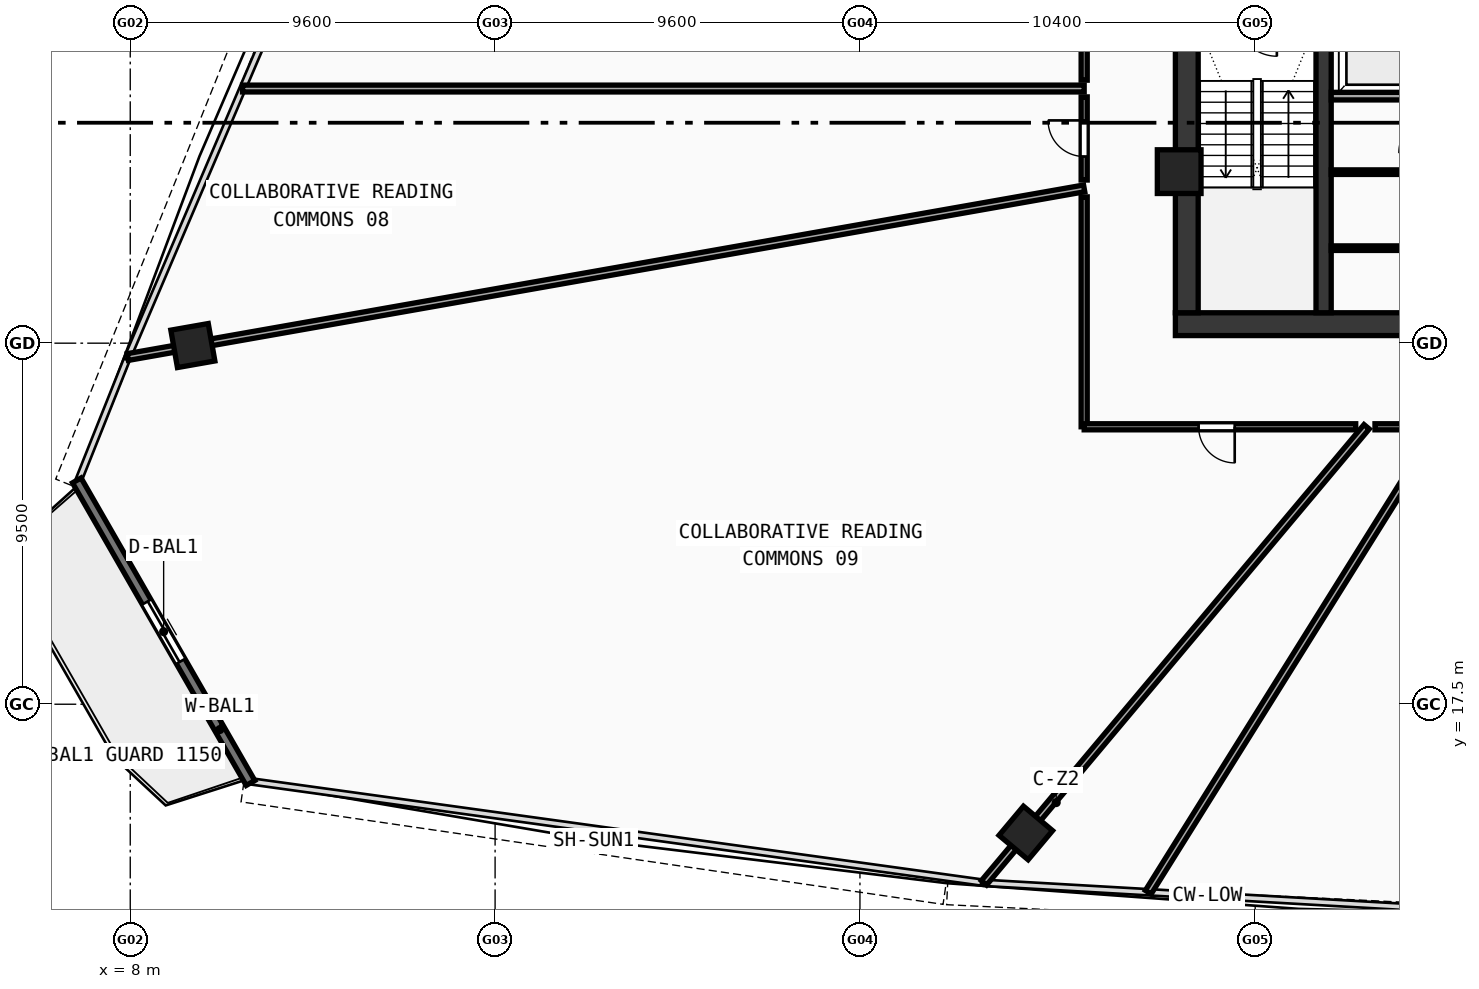
"""IFC4 building model, lengths in metres.
Left out: names, types, materials, properties, quantities, classifications, styles, units other than length and angle.
Written with IfcOpenShell. Run it as: python <this file> out.ifc"""

import sys

from ifc_helpers import new_model, si_unit, direction, frame, frame_2d, origin, origin_with_axes, origin_2d, place, context, subcontext, project, spatial, rectangle, hollow_rectangle, extrude, source, transform, mapped, element, fill, save


model = new_model("IFC4")
c1 = context("Model", 3, precision=1e-05, world=origin(), true_north=direction((0.0, 1.0)))
c2 = subcontext(c1, "Body", "Model", "MODEL_VIEW")
j1 = project(units=[si_unit("LENGTHUNIT", "METRE"), si_unit("PLANEANGLEUNIT", "RADIAN")], contexts=[c1])
p1 = place(None, origin())
s1 = spatial("IfcSite", under=j1, at=p1, CompositionType="ELEMENT")
p2 = place(p1, origin())
s2 = spatial("IfcBuilding", under=s1, at=p2, CompositionType="ELEMENT")
p3 = place(p2, frame((0.0, 0.0, 103.98)))
s3 = spatial("IfcBuildingStorey", under=s2, at=p3, CompositionType="ELEMENT", Elevation=103.98)
p4 = place(p3, frame((35.5, 27.5, 0.0), z_axis=(0.0, 0.0, 1.0), x_axis=(1.0, 0.0, 0.0)))
e1 = element("IfcWall", 1, at=p4, inside=s3, PredefinedType="SHEAR", context=c2, shape_type="SweptSolid", body=[
    extrude(rectangle(XDim=25.0, YDim=0.6, at=frame_2d((12.5, 0.0))), origin(), (0.0, 0.0, 1.0), 3.54),
])
p5 = place(p3, frame((35.8, 27.8, 0.0), z_axis=(0.0, 0.0, 1.0), x_axis=(0.0, 1.0, 0.0)))
e2 = element("IfcWall", 2, at=p5, inside=s3, PredefinedType="SHEAR", context=c2, shape_type="SweptSolid", body=[
    extrude(rectangle(XDim=12.1, YDim=0.6, at=frame_2d((6.05, 0.0))), origin(), (0.0, 0.0, 1.0), 3.54),
])
p6 = place(p3, frame((39.4, 27.8, 0.0), z_axis=(0.0, 0.0, 1.0), x_axis=(0.0, 1.0, 0.0)))
e3 = element("IfcWall", 3, at=p6, inside=s3, PredefinedType="SHEAR", context=c2, shape_type="SweptSolid", body=[
    extrude(rectangle(XDim=12.1, YDim=0.4, at=frame_2d((6.05, 0.0))), origin(), (0.0, 0.0, 1.0), 3.54),
])
p7 = place(p6, frame((9.95, 0.0, 0.0)))
e4 = element("IfcOpeningElement", 4, at=p7, cuts=e3, PredefinedType="OPENING", context=c2, shape_type="SweptSolid", body=[
    extrude(rectangle(XDim=1.1, YDim=2.1, at=frame_2d((0.55, 1.05))), frame((0.0, 0.21, 0.0), z_axis=(0.0, -1.0, 0.0), x_axis=(1.0, 0.0, 0.0)), (0.0, 0.0, 1.0), 0.42),
])
m1 = source(origin(), c2, "Body", "SweptSolid", [
    extrude(hollow_rectangle(XDim=1.15, YDim=1.15, WallThickness=0.048, at=origin_2d()), origin(), (0.0, 0.0, 1.0), 3.8),
])
p8 = place(p3, frame((35.6, 31.513, -0.26), z_axis=(0.0, 0.0, 1.0), x_axis=(1.0, 0.0, 0.0)))
e5 = element("IfcColumn", 5, at=p8, inside=s3, PredefinedType="COLUMN", context=c2, shape_type="MappedRepresentation", body=[
    mapped(m1, transform((0.0, 0.0, 0.0), scale=1.0)),
])
m2 = source(origin(), c2, "Body", "SweptSolid", [
    extrude(hollow_rectangle(XDim=1.0, YDim=1.0, WallThickness=0.042, at=origin_2d()), origin(), (0.0, 0.0, 1.0), 3.8),
])
for number, where, z_axis, x_axis in (
    (6, (31.564, 14.112, -0.26), (0.0, 0.0, 1.0), (0.766, -0.643, 0.0)),
    (7, (9.647, 26.938, -0.26), (0.0, 0.0, 1.0), (0.174, -0.985, 0.0)),
):
    element("IfcColumn", number, at=place(p3, frame(where, z_axis=z_axis, x_axis=x_axis)), inside=s3, PredefinedType="COLUMN", context=c2, shape_type="MappedRepresentation", body=[
        mapped(m2, transform((0.0, 0.0, 0.0), scale=1.0)),
    ])
p9 = place(p3, frame((6.593, 23.39, 0.0), z_axis=(0.0, 0.0, 1.0), x_axis=(0.497913445573, -0.867226729707, 0.0)))
e8 = element("IfcWall", 8, at=p9, inside=s3, PredefinedType="STANDARD", context=c2, shape_type="SweptSolid", body=[
    extrude(rectangle(XDim=9.181, YDim=0.26, at=frame_2d((4.59, 0.0))), origin(), (0.0, 0.0, 1.0), 3.54),
])
p10 = place(p9, frame((3.69, 0.0, 0.0)))
e9 = element("IfcOpeningElement", 9, at=p10, cuts=e8, PredefinedType="OPENING", context=c2, shape_type="SweptSolid", body=[
    extrude(rectangle(XDim=1.8, YDim=2.15, at=frame_2d((0.9, 1.075))), frame((0.0, 0.14, 0.0), z_axis=(0.0, -1.0, 0.0), x_axis=(1.0, 0.0, 0.0)), (0.0, 0.0, 1.0), 0.28),
])
p11 = place(p3, frame((39.6, 33.5, 0.0), z_axis=(0.0, 0.0, 1.0), x_axis=(1.0, 0.0, 0.0)))
e10 = element("IfcWall", 10, at=p11, inside=s3, PredefinedType="SOLIDWALL", context=c2, shape_type="SweptSolid", body=[
    extrude(rectangle(XDim=2.72, YDim=0.2, at=frame_2d((1.36, 0.0))), origin(), (0.0, 0.0, 1.0), 3.54),
])
for number, where, z_axis, x_axis in (
    (11, (39.6, 29.5, 0.0), (0.0, 0.0, 1.0), (1.0, 0.0, 0.0)),
    (12, (39.6, 31.5, 0.0), (0.0, 0.0, 1.0), (1.0, 0.0, 0.0)),
):
    element("IfcWall", number, at=place(p3, frame(where, z_axis=z_axis, x_axis=x_axis)), inside=s3, PredefinedType="PARTITIONING", context=c2, shape_type="SweptSolid", body=[
        extrude(rectangle(XDim=2.72, YDim=0.12, at=frame_2d((1.36, 0.0))), origin(), (0.0, 0.0, 1.0), 3.54),
    ])
p12 = place(p3, frame((33.1, 33.7, 0.0), z_axis=(0.0, 0.0, 1.0), x_axis=(-1.0, 0.0, 0.0)))
e13 = element("IfcWall", 13, at=p12, inside=s3, PredefinedType="PARTITIONING", context=c2, shape_type="SweptSolid", body=[
    extrude(rectangle(XDim=22.145, YDim=0.18, at=frame_2d((11.073, 0.0))), origin(), (0.0, 0.0, 1.0), 2.84),
])
p13 = place(p3, frame((33.1, 31.073, 0.0), z_axis=(0.0, 0.0, 1.0), x_axis=(-0.984807595402, -0.173649071515, 0.0)))
e14 = element("IfcWall", 14, at=p13, inside=s3, PredefinedType="PARTITIONING", context=c2, shape_type="SweptSolid", body=[
    extrude(rectangle(XDim=25.553, YDim=0.18, at=frame_2d((12.776, 0.0))), origin(), (0.0, 0.0, 1.0), 2.84),
])
p14 = place(p3, frame((40.532, 24.8, 0.0), z_axis=(0.0, 0.0, 1.0), x_axis=(-0.642779306778, -0.76605141001, 0.0)))
e15 = element("IfcWall", 15, at=p14, inside=s3, PredefinedType="PARTITIONING", context=c2, shape_type="SweptSolid", body=[
    extrude(rectangle(XDim=15.664, YDim=0.18, at=frame_2d((7.832, 0.0))), origin(), (0.0, 0.0, 1.0), 2.84),
])
p15 = place(p3, frame((42.439, 24.8, 0.0), z_axis=(0.0, 0.0, 1.0), x_axis=(-0.529922955224, -0.848045789758, 0.0)))
e16 = element("IfcWall", 16, at=p15, inside=s3, PredefinedType="PARTITIONING", context=c2, shape_type="SweptSolid", body=[
    extrude(rectangle(XDim=14.441, YDim=0.18, at=frame_2d((7.22, 0.0))), origin(), (0.0, 0.0, 1.0), 2.84),
])
p16 = place(p3, frame((33.1, 24.8, 0.0), z_axis=(0.0, 0.0, 1.0), x_axis=(0.0, 1.0, 0.0)))
e17 = element("IfcWall", 17, at=p16, inside=s3, PredefinedType="PARTITIONING", context=c2, shape_type="SweptSolid", body=[
    extrude(rectangle(XDim=6.049, YDim=0.16, at=frame_2d((3.025, 0.0))), origin(), (0.0, 0.0, 1.0), 3.14),
])
p17 = place(p3, frame((33.1, 31.292, 0.0), z_axis=(0.0, 0.0, 1.0), x_axis=(0.0, 1.0, 0.0)))
e18 = element("IfcWall", 18, at=p17, inside=s3, PredefinedType="PARTITIONING", context=c2, shape_type="SweptSolid", body=[
    extrude(rectangle(XDim=2.188, YDim=0.16, at=frame_2d((1.094, 0.0))), origin(), (0.0, 0.0, 1.0), 3.54),
])
p18 = place(p17, frame((0.619, 0.0, 0.0)))
e19 = element("IfcOpeningElement", 19, at=p18, cuts=e18, PredefinedType="OPENING", context=c2, shape_type="SweptSolid", body=[
    extrude(rectangle(XDim=0.95, YDim=2.1, at=frame_2d((0.475, 1.05))), frame((0.0, 0.09, 0.0), z_axis=(0.0, -1.0, 0.0), x_axis=(1.0, 0.0, 0.0)), (0.0, 0.0, 1.0), 0.18),
])
p19 = place(p3, frame((33.1, 33.92, 0.0), z_axis=(0.0, 0.0, 1.0), x_axis=(0.0, 1.0, 0.0)))
e20 = element("IfcWall", 20, at=p19, inside=s3, PredefinedType="PARTITIONING", context=c2, shape_type="SweptSolid", body=[
    extrude(rectangle(XDim=4.402, YDim=0.16, at=frame_2d((2.201, 0.0))), origin(), (0.0, 0.0, 1.0), 3.54),
])
p20 = place(p19, frame((1.726, 0.0, 0.0)))
e21 = element("IfcOpeningElement", 21, at=p20, cuts=e20, PredefinedType="OPENING", context=c2, shape_type="SweptSolid", body=[
    extrude(rectangle(XDim=0.95, YDim=2.1, at=frame_2d((0.475, 1.05))), frame((0.0, 0.09, 0.0), z_axis=(0.0, -1.0, 0.0), x_axis=(1.0, 0.0, 0.0)), (0.0, 0.0, 1.0), 0.18),
])
p21 = place(p3, frame((42.179, 24.8, 0.0), z_axis=(0.0, 0.0, 1.0), x_axis=(-1.0, 0.0, 0.0)))
e22 = element("IfcWall", 22, at=p21, inside=s3, PredefinedType="PARTITIONING", context=c2, shape_type="SweptSolid", body=[
    extrude(rectangle(XDim=1.427, YDim=0.16, at=frame_2d((0.714, 0.0))), origin(), (0.0, 0.0, 1.0), 2.84),
])
p22 = place(p3, frame((40.245, 24.8, 0.0), z_axis=(0.0, 0.0, 1.0), x_axis=(-1.0, 0.0, 0.0)))
e23 = element("IfcWall", 23, at=p22, inside=s3, PredefinedType="PARTITIONING", context=c2, shape_type="SweptSolid", body=[
    extrude(rectangle(XDim=7.145, YDim=0.16, at=frame_2d((3.572, 0.0))), origin(), (0.0, 0.0, 1.0), 3.14),
])
p23 = place(p22, frame((3.184, 0.0, 0.0)))
e24 = element("IfcOpeningElement", 24, at=p23, cuts=e23, PredefinedType="OPENING", context=c2, shape_type="SweptSolid", body=[
    extrude(rectangle(XDim=0.95, YDim=2.1, at=frame_2d((0.475, 1.05))), frame((0.0, 0.09, 0.0), z_axis=(0.0, -1.0, 0.0), x_axis=(1.0, 0.0, 0.0)), (0.0, 0.0, 1.0), 0.18),
])
m3 = source(origin(), c2, "Body", "SweptSolid", [
    extrude(rectangle(XDim=1.8, YDim=2.15, at=frame_2d((0.9, 1.075))), frame((0.0, 0.025, 0.0), z_axis=(0.0, -1.0, 0.0), x_axis=(1.0, 0.0, 0.0)), (0.0, 0.0, 1.0), 0.05),
])
p24 = place(p10, origin_with_axes())
e25 = element("IfcDoor", 25, at=p24, inside=s3, OperationType="DOUBLE_DOOR_SLIDING", PredefinedType="DOOR", context=c2, shape_type="MappedRepresentation", body=[
    mapped(m3, transform((0.0, 0.0, 0.0), scale=1.0)),
])
fill(e9, e25)
m4 = source(origin(), c2, "Body", "SweptSolid", [
    extrude(rectangle(XDim=0.95, YDim=2.1, at=frame_2d((0.475, 1.05))), frame((0.0, 0.025, 0.0), z_axis=(0.0, -1.0, 0.0), x_axis=(1.0, 0.0, 0.0)), (0.0, 0.0, 1.0), 0.05),
])
p25 = place(p18, origin_with_axes())
e26 = element("IfcDoor", 26, at=p25, inside=s3, OperationType="SINGLE_SWING_RIGHT", PredefinedType="DOOR", context=c2, shape_type="MappedRepresentation", body=[
    mapped(m4, transform((0.0, 0.0, 0.0), scale=1.0)),
])
fill(e19, e26)
p26 = place(p23, origin_with_axes())
e27 = element("IfcDoor", 27, at=p26, inside=s3, OperationType="SINGLE_SWING_LEFT", PredefinedType="DOOR", context=c2, shape_type="MappedRepresentation", body=[
    mapped(m4, transform((0.0, 0.0, 0.0), scale=1.0)),
])
fill(e24, e27)
save(model, sys.argv[1])
